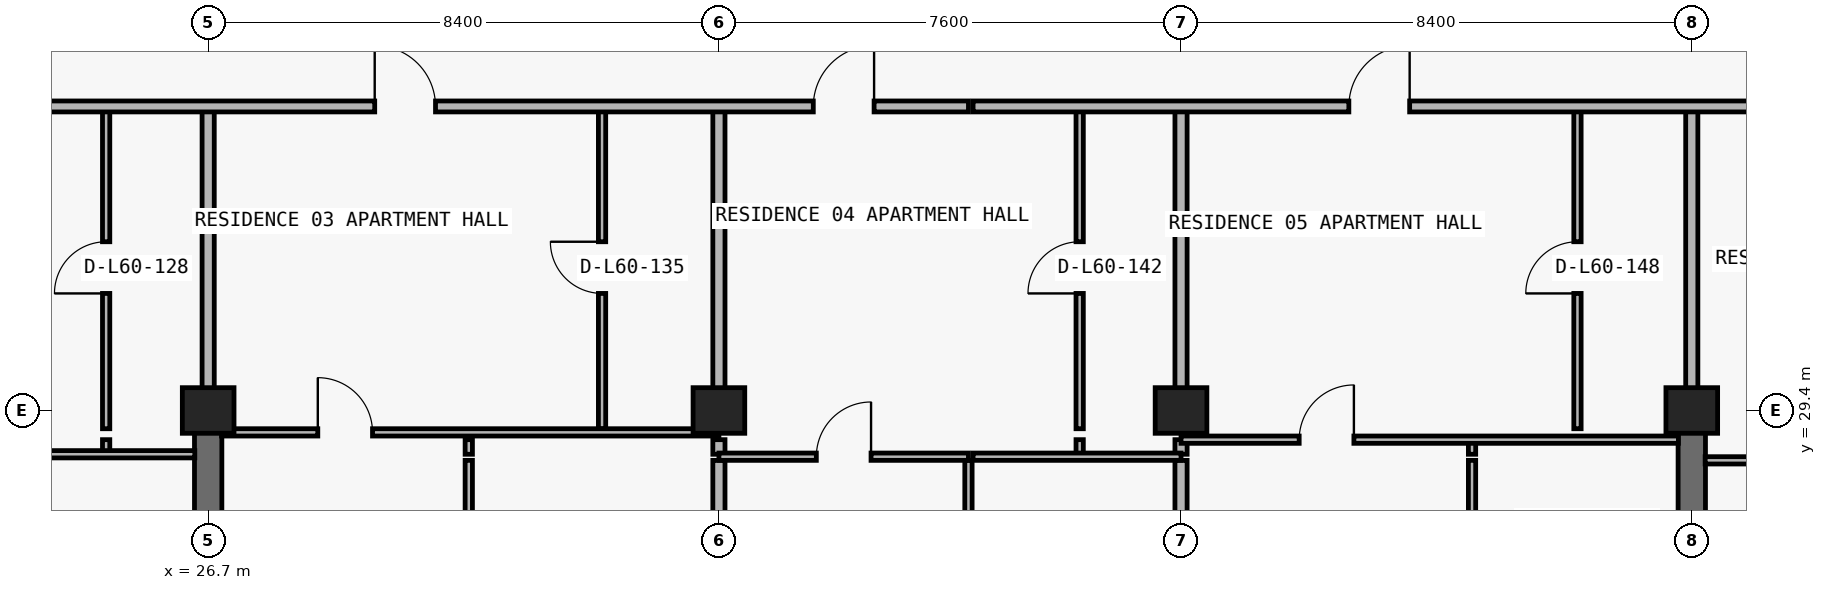
"""IFC4 building model, lengths in metres.
Left out: names, types, materials, properties, quantities, classifications, styles, units other than length and angle.
Written with IfcOpenShell. Run it as: python <this file> out.ifc"""

import sys

from ifc_helpers import new_model, si_unit, direction, frame, frame_2d, origin, origin_2d, place, context, subcontext, project, spatial, rectangle, extrude, element, fill, save


model = new_model("IFC4")
c1 = context("Model", 3, precision=1e-05, world=origin(), true_north=direction((0.0, 1.0)))
c2 = subcontext(c1, "Body", "Model", "MODEL_VIEW")
j1 = project(units=[si_unit("LENGTHUNIT", "METRE"), si_unit("PLANEANGLEUNIT", "RADIAN")], contexts=[c1])
p1 = place(None, origin())
s1 = spatial("IfcSite", under=j1, at=p1, CompositionType="ELEMENT")
p2 = place(p1, origin())
s2 = spatial("IfcBuilding", under=s1, at=p2, CompositionType="ELEMENT")
p3 = place(p2, frame((0.0, 0.0, 214.8)))
s3 = spatial("IfcBuildingStorey", under=s2, at=p3, CompositionType="ELEMENT", Elevation=214.8)
for number, where, z_axis, x_axis in (
    (1, (26.7, 29.4, 0.0), (0.0, 0.0, 1.0), (1.0, 0.0, 0.0)),
    (2, (35.1, 29.4, 0.0), (0.0, 0.0, 1.0), (1.0, 0.0, 0.0)),
    (3, (42.7, 29.4, 0.0), (0.0, 0.0, 1.0), (1.0, 0.0, 0.0)),
    (4, (51.1, 29.4, 0.0), (0.0, 0.0, 1.0), (1.0, 0.0, 0.0)),
):
    element("IfcColumn", number, at=place(p3, frame(where, z_axis=z_axis, x_axis=x_axis)), inside=s3, PredefinedType="COLUMN", context=c2, shape_type="SweptSolid", body=[
        extrude(rectangle(XDim=0.85, YDim=0.75, at=origin_2d()), origin(), (0.0, 0.0, 1.0), 3.05),
    ])
for number, where, z_axis, x_axis in (
    (5, (26.7, 20.8, 0.0), (0.0, 0.0, 1.0), (0.0, 1.0, 0.0)),
    (6, (51.1, 20.8, 0.0), (0.0, 0.0, 1.0), (0.0, 1.0, 0.0)),
):
    element("IfcWall", number, at=place(p3, frame(where, z_axis=z_axis, x_axis=x_axis)), inside=s3, PredefinedType="SHEAR", context=c2, shape_type="SweptSolid", body=[
        extrude(rectangle(XDim=8.6, YDim=0.45, at=frame_2d((4.3, 0.0))), origin(), (0.0, 0.0, 1.0), 3.05),
    ])
p4 = place(p3, frame((25.022, 28.68, 0.0), z_axis=(0.0, 0.0, 1.0), x_axis=(0.0, 1.0, 0.0)))
e7 = element("IfcWall", 7, at=p4, inside=s3, PredefinedType="PARTITIONING", context=c2, shape_type="SweptSolid", body=[
    extrude(rectangle(XDim=0.24, YDim=0.12, at=frame_2d((0.12, 0.0))), origin(), (0.0, 0.0, 1.0), 3.05),
])
p5 = place(p3, frame((25.022, 29.1, 0.0), z_axis=(0.0, 0.0, 1.0), x_axis=(0.0, 1.0, 0.0)))
e8 = element("IfcWall", 8, at=p5, inside=s3, PredefinedType="PARTITIONING", context=c2, shape_type="SweptSolid", body=[
    extrude(rectangle(XDim=5.3, YDim=0.12, at=frame_2d((2.65, 0.0))), origin(), (0.0, 0.0, 1.0), 3.05),
])
p6 = place(p5, frame((2.225, 0.0, 0.0)))
e9 = element("IfcOpeningElement", 9, at=p6, cuts=e8, PredefinedType="OPENING", context=c2, shape_type="SweptSolid", body=[
    extrude(rectangle(XDim=0.85, YDim=2.1, at=frame_2d((0.425, 1.05))), frame((0.0, 0.07, 0.0), z_axis=(0.0, -1.0, 0.0), x_axis=(1.0, 0.0, 0.0)), (0.0, 0.0, 1.0), 0.14),
])
p7 = place(p3, frame((26.7, 29.405, 0.0), z_axis=(0.0, 0.0, 1.0), x_axis=(0.0, 1.0, 0.0)))
e10 = element("IfcWall", 10, at=p7, inside=s3, PredefinedType="PARTITIONING", context=c2, shape_type="SweptSolid", body=[
    extrude(rectangle(XDim=4.995, YDim=0.2, at=frame_2d((2.498, 0.0))), origin(), (0.0, 0.0, 1.0), 2.335),
])
p8 = place(p3, frame((30.986, 23.89, 0.0), z_axis=(0.0, 0.0, 1.0), x_axis=(0.0, 1.0, 0.0)))
e11 = element("IfcWall", 11, at=p8, inside=s3, PredefinedType="PARTITIONING", context=c2, shape_type="SweptSolid", body=[
    extrude(rectangle(XDim=4.69, YDim=0.12, at=frame_2d((2.345, 0.0))), origin(), (0.0, 0.0, 1.0), 3.05),
])
p9 = place(p8, frame((1.895, 0.0, 0.0)))
e12 = element("IfcOpeningElement", 12, at=p9, cuts=e11, PredefinedType="OPENING", context=c2, shape_type="SweptSolid", body=[
    extrude(rectangle(XDim=0.9, YDim=2.15, at=frame_2d((0.45, 1.075))), frame((0.0, 0.07, 0.0), z_axis=(0.0, -1.0, 0.0), x_axis=(1.0, 0.0, 0.0)), (0.0, 0.0, 1.0), 0.14),
])
p10 = place(p3, frame((30.986, 28.68, 0.0), z_axis=(0.0, 0.0, 1.0), x_axis=(0.0, 1.0, 0.0)))
e13 = element("IfcWall", 13, at=p10, inside=s3, PredefinedType="PARTITIONING", context=c2, shape_type="SweptSolid", body=[
    extrude(rectangle(XDim=0.24, YDim=0.12, at=frame_2d((0.12, 0.0))), origin(), (0.0, 0.0, 1.0), 3.05),
])
p11 = place(p3, frame((33.178, 29.1, 0.0), z_axis=(0.0, 0.0, 1.0), x_axis=(0.0, 1.0, 0.0)))
e14 = element("IfcWall", 14, at=p11, inside=s3, PredefinedType="PARTITIONING", context=c2, shape_type="SweptSolid", body=[
    extrude(rectangle(XDim=5.3, YDim=0.12, at=frame_2d((2.65, 0.0))), origin(), (0.0, 0.0, 1.0), 3.05),
])
p12 = place(p11, frame((2.225, 0.0, 0.0)))
e15 = element("IfcOpeningElement", 15, at=p12, cuts=e14, PredefinedType="OPENING", context=c2, shape_type="SweptSolid", body=[
    extrude(rectangle(XDim=0.85, YDim=2.1, at=frame_2d((0.425, 1.05))), frame((0.0, 0.07, 0.0), z_axis=(0.0, -1.0, 0.0), x_axis=(1.0, 0.0, 0.0)), (0.0, 0.0, 1.0), 0.14),
])
p13 = place(p3, frame((35.1, 23.89, 0.0), z_axis=(0.0, 0.0, 1.0), x_axis=(0.0, 1.0, 0.0)))
e16 = element("IfcWall", 16, at=p13, inside=s3, PredefinedType="PARTITIONING", context=c2, shape_type="SweptSolid", body=[
    extrude(rectangle(XDim=4.69, YDim=0.2, at=frame_2d((2.345, 0.0))), origin(), (0.0, 0.0, 1.0), 2.263),
])
p14 = place(p3, frame((35.1, 28.68, 0.0), z_axis=(0.0, 0.0, 1.0), x_axis=(0.0, 1.0, 0.0)))
e17 = element("IfcWall", 17, at=p14, inside=s3, PredefinedType="PARTITIONING", context=c2, shape_type="SweptSolid", body=[
    extrude(rectangle(XDim=0.24, YDim=0.2, at=frame_2d((0.12, 0.0))), origin(), (0.0, 0.0, 1.0), 2.263),
])
p15 = place(p3, frame((35.1, 29.1, 0.0), z_axis=(0.0, 0.0, 1.0), x_axis=(0.0, 1.0, 0.0)))
e18 = element("IfcWall", 18, at=p15, inside=s3, PredefinedType="PARTITIONING", context=c2, shape_type="SweptSolid", body=[
    extrude(rectangle(XDim=5.3, YDim=0.2, at=frame_2d((2.65, 0.0))), origin(), (0.0, 0.0, 1.0), 2.263),
])
p16 = place(p3, frame((39.204, 23.89, 0.0), z_axis=(0.0, 0.0, 1.0), x_axis=(0.0, 1.0, 0.0)))
e19 = element("IfcWall", 19, at=p16, inside=s3, PredefinedType="PARTITIONING", context=c2, shape_type="SweptSolid", body=[
    extrude(rectangle(XDim=4.69, YDim=0.12, at=frame_2d((2.345, 0.0))), origin(), (0.0, 0.0, 1.0), 3.05),
])
p17 = place(p16, frame((1.895, 0.0, 0.0)))
e20 = element("IfcOpeningElement", 20, at=p17, cuts=e19, PredefinedType="OPENING", context=c2, shape_type="SweptSolid", body=[
    extrude(rectangle(XDim=0.9, YDim=2.15, at=frame_2d((0.45, 1.075))), frame((0.0, 0.07, 0.0), z_axis=(0.0, -1.0, 0.0), x_axis=(1.0, 0.0, 0.0)), (0.0, 0.0, 1.0), 0.14),
])
p18 = place(p3, frame((41.033, 28.68, 0.0), z_axis=(0.0, 0.0, 1.0), x_axis=(0.0, 1.0, 0.0)))
e21 = element("IfcWall", 21, at=p18, inside=s3, PredefinedType="PARTITIONING", context=c2, shape_type="SweptSolid", body=[
    extrude(rectangle(XDim=0.24, YDim=0.12, at=frame_2d((0.12, 0.0))), origin(), (0.0, 0.0, 1.0), 3.05),
])
p19 = place(p3, frame((41.033, 29.1, 0.0), z_axis=(0.0, 0.0, 1.0), x_axis=(0.0, 1.0, 0.0)))
e22 = element("IfcWall", 22, at=p19, inside=s3, PredefinedType="PARTITIONING", context=c2, shape_type="SweptSolid", body=[
    extrude(rectangle(XDim=5.3, YDim=0.12, at=frame_2d((2.65, 0.0))), origin(), (0.0, 0.0, 1.0), 3.05),
])
p20 = place(p19, frame((2.225, 0.0, 0.0)))
e23 = element("IfcOpeningElement", 23, at=p20, cuts=e22, PredefinedType="OPENING", context=c2, shape_type="SweptSolid", body=[
    extrude(rectangle(XDim=0.85, YDim=2.1, at=frame_2d((0.425, 1.05))), frame((0.0, 0.07, 0.0), z_axis=(0.0, -1.0, 0.0), x_axis=(1.0, 0.0, 0.0)), (0.0, 0.0, 1.0), 0.14),
])
p21 = place(p3, frame((42.7, 23.89, 0.0), z_axis=(0.0, 0.0, 1.0), x_axis=(0.0, 1.0, 0.0)))
e24 = element("IfcWall", 24, at=p21, inside=s3, PredefinedType="PARTITIONING", context=c2, shape_type="SweptSolid", body=[
    extrude(rectangle(XDim=4.69, YDim=0.2, at=frame_2d((2.345, 0.0))), origin(), (0.0, 0.0, 1.0), 2.263),
])
p22 = place(p3, frame((42.7, 28.68, 0.0), z_axis=(0.0, 0.0, 1.0), x_axis=(0.0, 1.0, 0.0)))
e25 = element("IfcWall", 25, at=p22, inside=s3, PredefinedType="PARTITIONING", context=c2, shape_type="SweptSolid", body=[
    extrude(rectangle(XDim=0.24, YDim=0.2, at=frame_2d((0.12, 0.0))), origin(), (0.0, 0.0, 1.0), 2.263),
])
p23 = place(p3, frame((42.7, 29.1, 0.0), z_axis=(0.0, 0.0, 1.0), x_axis=(0.0, 1.0, 0.0)))
e26 = element("IfcWall", 26, at=p23, inside=s3, PredefinedType="PARTITIONING", context=c2, shape_type="SweptSolid", body=[
    extrude(rectangle(XDim=5.3, YDim=0.2, at=frame_2d((2.65, 0.0))), origin(), (0.0, 0.0, 1.0), 2.263),
])
p24 = place(p3, frame((47.486, 23.89, 0.0), z_axis=(0.0, 0.0, 1.0), x_axis=(0.0, 1.0, 0.0)))
e27 = element("IfcWall", 27, at=p24, inside=s3, PredefinedType="PARTITIONING", context=c2, shape_type="SweptSolid", body=[
    extrude(rectangle(XDim=4.69, YDim=0.12, at=frame_2d((2.345, 0.0))), origin(), (0.0, 0.0, 1.0), 3.05),
])
p25 = place(p24, frame((1.895, 0.0, 0.0)))
e28 = element("IfcOpeningElement", 28, at=p25, cuts=e27, PredefinedType="OPENING", context=c2, shape_type="SweptSolid", body=[
    extrude(rectangle(XDim=0.9, YDim=2.15, at=frame_2d((0.45, 1.075))), frame((0.0, 0.07, 0.0), z_axis=(0.0, -1.0, 0.0), x_axis=(1.0, 0.0, 0.0)), (0.0, 0.0, 1.0), 0.14),
])
p26 = place(p3, frame((47.486, 28.68, 0.0), z_axis=(0.0, 0.0, 1.0), x_axis=(0.0, 1.0, 0.0)))
e29 = element("IfcWall", 29, at=p26, inside=s3, PredefinedType="PARTITIONING", context=c2, shape_type="SweptSolid", body=[
    extrude(rectangle(XDim=0.24, YDim=0.12, at=frame_2d((0.12, 0.0))), origin(), (0.0, 0.0, 1.0), 3.05),
])
p27 = place(p3, frame((49.22, 29.1, 0.0), z_axis=(0.0, 0.0, 1.0), x_axis=(0.0, 1.0, 0.0)))
e30 = element("IfcWall", 30, at=p27, inside=s3, PredefinedType="PARTITIONING", context=c2, shape_type="SweptSolid", body=[
    extrude(rectangle(XDim=5.3, YDim=0.12, at=frame_2d((2.65, 0.0))), origin(), (0.0, 0.0, 1.0), 3.05),
])
p28 = place(p27, frame((2.225, 0.0, 0.0)))
e31 = element("IfcOpeningElement", 31, at=p28, cuts=e30, PredefinedType="OPENING", context=c2, shape_type="SweptSolid", body=[
    extrude(rectangle(XDim=0.85, YDim=2.1, at=frame_2d((0.425, 1.05))), frame((0.0, 0.07, 0.0), z_axis=(0.0, -1.0, 0.0), x_axis=(1.0, 0.0, 0.0)), (0.0, 0.0, 1.0), 0.14),
])
p29 = place(p3, frame((51.1, 29.405, 0.0), z_axis=(0.0, 0.0, 1.0), x_axis=(0.0, 1.0, 0.0)))
e32 = element("IfcWall", 32, at=p29, inside=s3, PredefinedType="PARTITIONING", context=c2, shape_type="SweptSolid", body=[
    extrude(rectangle(XDim=4.995, YDim=0.2, at=frame_2d((2.498, 0.0))), origin(), (0.0, 0.0, 1.0), 2.335),
])
p30 = place(p3, frame((51.32, 28.58, 0.0), z_axis=(0.0, 0.0, 1.0), x_axis=(1.0, 0.0, 0.0)))
e33 = element("IfcWall", 33, at=p30, inside=s3, PredefinedType="PARTITIONING", context=c2, shape_type="SweptSolid", body=[
    extrude(rectangle(XDim=8.18, YDim=0.12, at=frame_2d((4.09, 0.0))), origin(), (0.0, 0.0, 1.0), 3.05),
])
p31 = place(p30, frame((1.583, 0.0, 0.0)))
e34 = element("IfcOpeningElement", 34, at=p31, cuts=e33, PredefinedType="OPENING", context=c2, shape_type="SweptSolid", body=[
    extrude(rectangle(XDim=0.9, YDim=2.15, at=frame_2d((0.45, 1.075))), frame((0.0, 0.07, 0.0), z_axis=(0.0, -1.0, 0.0), x_axis=(1.0, 0.0, 0.0)), (0.0, 0.0, 1.0), 0.14),
])
p32 = place(p3, frame((35.1, 28.64, 0.0), z_axis=(0.0, 0.0, 1.0), x_axis=(1.0, 0.0, 0.0)))
e35 = element("IfcWall", 35, at=p32, inside=s3, PredefinedType="PARTITIONING", context=c2, shape_type="SweptSolid", body=[
    extrude(rectangle(XDim=4.104, YDim=0.12, at=frame_2d((2.052, 0.0))), origin(), (0.0, 0.0, 1.0), 3.05),
])
p33 = place(p32, frame((1.602, 0.0, 0.0)))
e36 = element("IfcOpeningElement", 36, at=p33, cuts=e35, PredefinedType="OPENING", context=c2, shape_type="SweptSolid", body=[
    extrude(rectangle(XDim=0.9, YDim=2.15, at=frame_2d((0.45, 1.075))), frame((0.0, 0.07, 0.0), z_axis=(0.0, -1.0, 0.0), x_axis=(1.0, 0.0, 0.0)), (0.0, 0.0, 1.0), 0.14),
])
p34 = place(p3, frame((39.28, 28.64, 0.0), z_axis=(0.0, 0.0, 1.0), x_axis=(1.0, 0.0, 0.0)))
e37 = element("IfcWall", 37, at=p34, inside=s3, PredefinedType="PARTITIONING", context=c2, shape_type="SweptSolid", body=[
    extrude(rectangle(XDim=3.42, YDim=0.12, at=frame_2d((1.71, 0.0))), origin(), (0.0, 0.0, 1.0), 3.05),
])
p35 = place(p3, frame((18.3, 28.68, 0.0), z_axis=(0.0, 0.0, 1.0), x_axis=(1.0, 0.0, 0.0)))
e38 = element("IfcWall", 38, at=p35, inside=s3, PredefinedType="PARTITIONING", context=c2, shape_type="SweptSolid", body=[
    extrude(rectangle(XDim=8.18, YDim=0.12, at=frame_2d((4.09, 0.0))), origin(), (0.0, 0.0, 1.0), 3.05),
])
p36 = place(p35, frame((1.943, 0.0, 0.0)))
e39 = element("IfcOpeningElement", 39, at=p36, cuts=e38, PredefinedType="OPENING", context=c2, shape_type="SweptSolid", body=[
    extrude(rectangle(XDim=0.9, YDim=2.15, at=frame_2d((0.45, 1.075))), frame((0.0, 0.07, 0.0), z_axis=(0.0, -1.0, 0.0), x_axis=(1.0, 0.0, 0.0)), (0.0, 0.0, 1.0), 0.14),
])
p37 = place(p3, frame((42.7, 28.92, 0.0), z_axis=(0.0, 0.0, 1.0), x_axis=(1.0, 0.0, 0.0)))
e40 = element("IfcWall", 40, at=p37, inside=s3, PredefinedType="PARTITIONING", context=c2, shape_type="SweptSolid", body=[
    extrude(rectangle(XDim=8.18, YDim=0.12, at=frame_2d((4.09, 0.0))), origin(), (0.0, 0.0, 1.0), 3.05),
])
p38 = place(p37, frame((1.943, 0.0, 0.0)))
e41 = element("IfcOpeningElement", 41, at=p38, cuts=e40, PredefinedType="OPENING", context=c2, shape_type="SweptSolid", body=[
    extrude(rectangle(XDim=0.9, YDim=2.15, at=frame_2d((0.45, 1.075))), frame((0.0, 0.07, 0.0), z_axis=(0.0, -1.0, 0.0), x_axis=(1.0, 0.0, 0.0)), (0.0, 0.0, 1.0), 0.14),
])
p39 = place(p3, frame((26.92, 29.04, 0.0), z_axis=(0.0, 0.0, 1.0), x_axis=(1.0, 0.0, 0.0)))
e42 = element("IfcWall", 42, at=p39, inside=s3, PredefinedType="PARTITIONING", context=c2, shape_type="SweptSolid", body=[
    extrude(rectangle(XDim=8.18, YDim=0.12, at=frame_2d((4.09, 0.0))), origin(), (0.0, 0.0, 1.0), 3.05),
])
p40 = place(p39, frame((1.583, 0.0, 0.0)))
e43 = element("IfcOpeningElement", 43, at=p40, cuts=e42, PredefinedType="OPENING", context=c2, shape_type="SweptSolid", body=[
    extrude(rectangle(XDim=0.9, YDim=2.15, at=frame_2d((0.45, 1.075))), frame((0.0, 0.07, 0.0), z_axis=(0.0, -1.0, 0.0), x_axis=(1.0, 0.0, 0.0)), (0.0, 0.0, 1.0), 0.14),
])
p41 = place(p3, frame((10.105, 34.4, 0.0), z_axis=(0.0, 0.0, 1.0), x_axis=(1.0, 0.0, 0.0)))
e44 = element("IfcWall", 44, at=p41, inside=s3, PredefinedType="PARTITIONING", context=c2, shape_type="SweptSolid", body=[
    extrude(rectangle(XDim=29.099, YDim=0.18, at=frame_2d((14.55, 0.0))), origin(), (0.0, 0.0, 1.0), 3.05),
])
p42 = place(p41, frame((2.647, 0.0, 0.0)))
e45 = element("IfcOpeningElement", 45, at=p42, cuts=e44, PredefinedType="OPENING", context=c2, shape_type="SweptSolid", body=[
    extrude(rectangle(XDim=1.0, YDim=2.2, at=frame_2d((0.5, 1.1))), frame((0.0, 0.1, 0.0), z_axis=(0.0, -1.0, 0.0), x_axis=(1.0, 0.0, 0.0)), (0.0, 0.0, 1.0), 0.2),
])
p43 = place(p41, frame((11.056, 0.0, 0.0)))
e46 = element("IfcOpeningElement", 46, at=p43, cuts=e44, PredefinedType="OPENING", context=c2, shape_type="SweptSolid", body=[
    extrude(rectangle(XDim=1.0, YDim=2.2, at=frame_2d((0.5, 1.1))), frame((0.0, 0.1, 0.0), z_axis=(0.0, -1.0, 0.0), x_axis=(1.0, 0.0, 0.0)), (0.0, 0.0, 1.0), 0.2),
])
p44 = place(p41, frame((19.334, 0.0, 0.0)))
e47 = element("IfcOpeningElement", 47, at=p44, cuts=e44, PredefinedType="OPENING", context=c2, shape_type="SweptSolid", body=[
    extrude(rectangle(XDim=1.0, YDim=2.2, at=frame_2d((0.5, 1.1))), frame((0.0, 0.1, 0.0), z_axis=(0.0, -1.0, 0.0), x_axis=(1.0, 0.0, 0.0)), (0.0, 0.0, 1.0), 0.2),
])
p45 = place(p41, frame((26.547, 0.0, 0.0)))
e48 = element("IfcOpeningElement", 48, at=p45, cuts=e44, PredefinedType="OPENING", context=c2, shape_type="SweptSolid", body=[
    extrude(rectangle(XDim=1.0, YDim=2.2, at=frame_2d((0.5, 1.1))), frame((0.0, 0.1, 0.0), z_axis=(0.0, -1.0, 0.0), x_axis=(1.0, 0.0, 0.0)), (0.0, 0.0, 1.0), 0.2),
])
p46 = place(p3, frame((39.28, 34.4, 0.0), z_axis=(0.0, 0.0, 1.0), x_axis=(1.0, 0.0, 0.0)))
e49 = element("IfcWall", 49, at=p46, inside=s3, PredefinedType="PARTITIONING", context=c2, shape_type="SweptSolid", body=[
    extrude(rectangle(XDim=28.42, YDim=0.18, at=frame_2d((14.21, 0.0))), origin(), (0.0, 0.0, 1.0), 3.05),
])
p47 = place(p46, frame((6.18, 0.0, 0.0)))
e50 = element("IfcOpeningElement", 50, at=p47, cuts=e49, PredefinedType="OPENING", context=c2, shape_type="SweptSolid", body=[
    extrude(rectangle(XDim=1.0, YDim=2.2, at=frame_2d((0.5, 1.1))), frame((0.0, 0.1, 0.0), z_axis=(0.0, -1.0, 0.0), x_axis=(1.0, 0.0, 0.0)), (0.0, 0.0, 1.0), 0.2),
])
p48 = place(p46, frame((14.695, 0.0, 0.0)))
e51 = element("IfcOpeningElement", 51, at=p48, cuts=e49, PredefinedType="OPENING", context=c2, shape_type="SweptSolid", body=[
    extrude(rectangle(XDim=1.0, YDim=2.2, at=frame_2d((0.5, 1.1))), frame((0.0, 0.1, 0.0), z_axis=(0.0, -1.0, 0.0), x_axis=(1.0, 0.0, 0.0)), (0.0, 0.0, 1.0), 0.2),
])
p49 = place(p46, frame((22.87, 0.0, 0.0)))
e52 = element("IfcOpeningElement", 52, at=p49, cuts=e49, PredefinedType="OPENING", context=c2, shape_type="SweptSolid", body=[
    extrude(rectangle(XDim=1.0, YDim=2.2, at=frame_2d((0.5, 1.1))), frame((0.0, 0.1, 0.0), z_axis=(0.0, -1.0, 0.0), x_axis=(1.0, 0.0, 0.0)), (0.0, 0.0, 1.0), 0.2),
])
p50 = place(p6, origin())
e53 = element("IfcDoor", 53, at=p50, inside=s3, OperationType="SINGLE_SWING_LEFT", PredefinedType="DOOR", context=c2, shape_type="SweptSolid", body=[
    extrude(rectangle(XDim=0.85, YDim=2.1, at=frame_2d((0.425, 1.05))), frame((0.0, 0.025, 0.0), z_axis=(0.0, -1.0, 0.0), x_axis=(1.0, 0.0, 0.0)), (0.0, 0.0, 1.0), 0.05),
])
fill(e9, e53)
p51 = place(p44, origin())
e54 = element("IfcDoor", 54, at=p51, inside=s3, OperationType="SINGLE_SWING_LEFT", PredefinedType="DOOR", context=c2, shape_type="SweptSolid", body=[
    extrude(rectangle(XDim=1.0, YDim=2.2, at=frame_2d((0.5, 1.1))), frame((0.0, 0.025, 0.0), z_axis=(0.0, -1.0, 0.0), x_axis=(1.0, 0.0, 0.0)), (0.0, 0.0, 1.0), 0.05),
])
fill(e47, e54)
p52 = place(p12, origin())
e55 = element("IfcDoor", 55, at=p52, inside=s3, OperationType="SINGLE_SWING_RIGHT", PredefinedType="DOOR", context=c2, shape_type="SweptSolid", body=[
    extrude(rectangle(XDim=0.85, YDim=2.1, at=frame_2d((0.425, 1.05))), frame((0.0, 0.025, 0.0), z_axis=(0.0, -1.0, 0.0), x_axis=(1.0, 0.0, 0.0)), (0.0, 0.0, 1.0), 0.05),
])
fill(e15, e55)
p53 = place(p40, origin())
e56 = element("IfcDoor", 56, at=p53, inside=s3, OperationType="SINGLE_SWING_LEFT", PredefinedType="DOOR", context=c2, shape_type="SweptSolid", body=[
    extrude(rectangle(XDim=0.9, YDim=2.15, at=frame_2d((0.45, 1.075))), frame((0.0, 0.025, 0.0), z_axis=(0.0, -1.0, 0.0), x_axis=(1.0, 0.0, 0.0)), (0.0, 0.0, 1.0), 0.05),
])
fill(e43, e56)
p54 = place(p45, origin())
e57 = element("IfcDoor", 57, at=p54, inside=s3, OperationType="SINGLE_SWING_RIGHT", PredefinedType="DOOR", context=c2, shape_type="SweptSolid", body=[
    extrude(rectangle(XDim=1.0, YDim=2.2, at=frame_2d((0.5, 1.1))), frame((0.0, 0.025, 0.0), z_axis=(0.0, -1.0, 0.0), x_axis=(1.0, 0.0, 0.0)), (0.0, 0.0, 1.0), 0.05),
])
fill(e48, e57)
p55 = place(p20, origin())
e58 = element("IfcDoor", 58, at=p55, inside=s3, OperationType="SINGLE_SWING_LEFT", PredefinedType="DOOR", context=c2, shape_type="SweptSolid", body=[
    extrude(rectangle(XDim=0.85, YDim=2.1, at=frame_2d((0.425, 1.05))), frame((0.0, 0.025, 0.0), z_axis=(0.0, -1.0, 0.0), x_axis=(1.0, 0.0, 0.0)), (0.0, 0.0, 1.0), 0.05),
])
fill(e23, e58)
p56 = place(p33, origin())
e59 = element("IfcDoor", 59, at=p56, inside=s3, OperationType="SINGLE_SWING_RIGHT", PredefinedType="DOOR", context=c2, shape_type="SweptSolid", body=[
    extrude(rectangle(XDim=0.9, YDim=2.15, at=frame_2d((0.45, 1.075))), frame((0.0, 0.025, 0.0), z_axis=(0.0, -1.0, 0.0), x_axis=(1.0, 0.0, 0.0)), (0.0, 0.0, 1.0), 0.05),
])
fill(e36, e59)
p57 = place(p47, origin())
e60 = element("IfcDoor", 60, at=p57, inside=s3, OperationType="SINGLE_SWING_RIGHT", PredefinedType="DOOR", context=c2, shape_type="SweptSolid", body=[
    extrude(rectangle(XDim=1.0, YDim=2.2, at=frame_2d((0.5, 1.1))), frame((0.0, 0.025, 0.0), z_axis=(0.0, -1.0, 0.0), x_axis=(1.0, 0.0, 0.0)), (0.0, 0.0, 1.0), 0.05),
])
fill(e50, e60)
p58 = place(p28, origin())
e61 = element("IfcDoor", 61, at=p58, inside=s3, OperationType="SINGLE_SWING_LEFT", PredefinedType="DOOR", context=c2, shape_type="SweptSolid", body=[
    extrude(rectangle(XDim=0.85, YDim=2.1, at=frame_2d((0.425, 1.05))), frame((0.0, 0.025, 0.0), z_axis=(0.0, -1.0, 0.0), x_axis=(1.0, 0.0, 0.0)), (0.0, 0.0, 1.0), 0.05),
])
fill(e31, e61)
p59 = place(p38, origin())
e62 = element("IfcDoor", 62, at=p59, inside=s3, OperationType="SINGLE_SWING_RIGHT", PredefinedType="DOOR", context=c2, shape_type="SweptSolid", body=[
    extrude(rectangle(XDim=0.9, YDim=2.15, at=frame_2d((0.45, 1.075))), frame((0.0, 0.025, 0.0), z_axis=(0.0, -1.0, 0.0), x_axis=(1.0, 0.0, 0.0)), (0.0, 0.0, 1.0), 0.05),
])
fill(e41, e62)
save(model, sys.argv[1])
